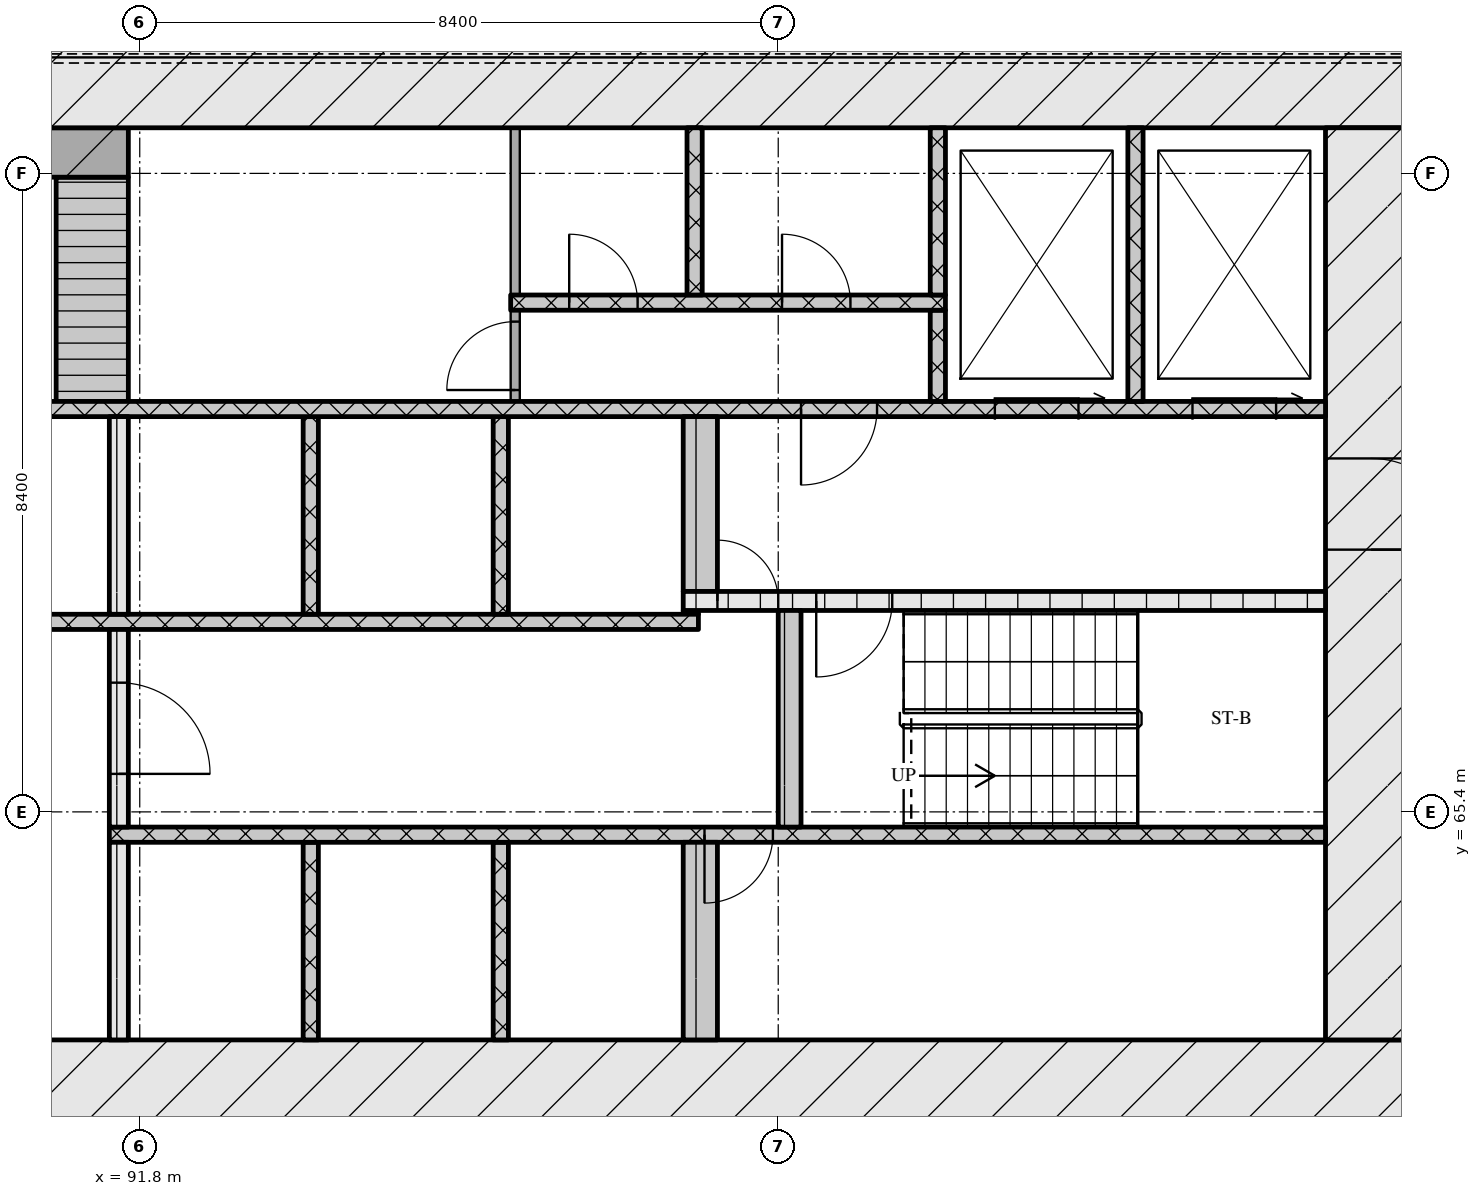
"""IFC4 building model, lengths in metres.
Left out: names, types, materials, properties, quantities, classifications, styles, units other than length and angle.
Written with IfcOpenShell. Run it as: python <this file> out.ifc"""

import sys

from ifc_helpers import new_model, si_unit, direction, frame, frame_2d, origin, place, context, subcontext, project, spatial, rectangle, extrude, element, fill, save


model = new_model("IFC4")
c1 = context("Model", 3, precision=1e-05, world=origin(), true_north=direction((0.0, 1.0)))
c2 = subcontext(c1, "Body", "Model", "MODEL_VIEW")
j1 = project(units=[si_unit("LENGTHUNIT", "METRE"), si_unit("PLANEANGLEUNIT", "RADIAN")], contexts=[c1])
p1 = place(None, origin())
s1 = spatial("IfcSite", under=j1, at=p1, CompositionType="ELEMENT")
p2 = place(p1, origin())
s2 = spatial("IfcBuilding", under=s1, at=p2, CompositionType="ELEMENT")
p3 = place(p2, frame((0.0, 0.0, 32.7)))
s3 = spatial("IfcBuildingStorey", under=s2, at=p3, CompositionType="ELEMENT", Elevation=32.7)
p4 = place(p3, frame((66.6, 61.8, 0.0), z_axis=(0.0, 0.0, 1.0), x_axis=(1.0, 0.0, 0.0)))
e1 = element("IfcWall", 1, at=p4, inside=s3, PredefinedType="SOLIDWALL", context=c2, shape_type="SweptSolid", body=[
    extrude(rectangle(XDim=42.0, YDim=1.2, at=frame_2d((21.0, 0.0))), origin(), (0.0, 0.0, 1.0), 4.22),
])
p5 = place(p4, frame((21.35, 0.0, 0.0)))
e2 = element("IfcOpeningElement", 2, at=p5, cuts=e1, PredefinedType="OPENING", context=c2, shape_type="SweptSolid", body=[
    extrude(rectangle(XDim=1.8, YDim=2.1, at=frame_2d((0.9, 1.05))), frame((0.0, 0.61, 0.0), z_axis=(0.0, -1.0, 0.0), x_axis=(1.0, 0.0, 0.0)), (0.0, 0.0, 1.0), 1.22),
])
p6 = place(p3, frame((66.6, 75.0, 0.0), z_axis=(0.0, 0.0, 1.0), x_axis=(1.0, 0.0, 0.0)))
e3 = element("IfcWall", 3, at=p6, inside=s3, PredefinedType="SOLIDWALL", context=c2, shape_type="SweptSolid", body=[
    extrude(rectangle(XDim=42.0, YDim=1.2, at=frame_2d((21.0, 0.0))), origin(), (0.0, 0.0, 1.0), 4.22),
])
p7 = place(p3, frame((108.0, 62.4, 0.0), z_axis=(0.0, 0.0, 1.0), x_axis=(0.0, 1.0, 0.0)))
e4 = element("IfcWall", 4, at=p7, inside=s3, PredefinedType="SOLIDWALL", context=c2, shape_type="SweptSolid", body=[
    extrude(rectangle(XDim=12.0, YDim=1.2, at=frame_2d((6.0, 0.0))), origin(), (0.0, 0.0, 1.0), 4.22),
])
p8 = place(p7, frame((6.45, 0.0, 0.0)))
e5 = element("IfcOpeningElement", 5, at=p8, cuts=e4, PredefinedType="OPENING", context=c2, shape_type="SweptSolid", body=[
    extrude(rectangle(XDim=1.2, YDim=2.1, at=frame_2d((0.6, 1.05))), frame((0.0, 0.61, 0.0), z_axis=(0.0, -1.0, 0.0), x_axis=(1.0, 0.0, 0.0)), (0.0, 0.0, 1.0), 1.22),
])
p9 = place(p3, frame((91.525, 62.4, 0.0), z_axis=(0.0, 0.0, 1.0), x_axis=(0.0, 1.0, 0.0)))
e6 = element("IfcWall", 6, at=p9, inside=s3, PredefinedType="SOLIDWALL", context=c2, shape_type="SweptSolid", body=[
    extrude(rectangle(XDim=2.6, YDim=0.25, at=frame_2d((1.3, 0.0))), origin(), (0.0, 0.0, 1.0), 4.22),
])
for number, where, z_axis, x_axis in (
    (7, (94.05, 62.4, 0.0), (0.0, 0.0, 1.0), (0.0, 1.0, 0.0)),
    (8, (96.55, 62.4, 0.0), (0.0, 0.0, 1.0), (0.0, 1.0, 0.0)),
):
    element("IfcWall", number, at=place(p3, frame(where, z_axis=z_axis, x_axis=x_axis)), inside=s3, PredefinedType="SOLIDWALL", context=c2, shape_type="SweptSolid", body=[
        extrude(rectangle(XDim=2.6, YDim=0.2, at=frame_2d((1.3, 0.0))), origin(), (0.0, 0.0, 1.0), 4.22),
    ])
p10 = place(p3, frame((99.175, 62.4, 0.0), z_axis=(0.0, 0.0, 1.0), x_axis=(0.0, 1.0, 0.0)))
e9 = element("IfcWall", 9, at=p10, inside=s3, PredefinedType="SOLIDWALL", context=c2, shape_type="SweptSolid", body=[
    extrude(rectangle(XDim=2.6, YDim=0.45, at=frame_2d((1.3, 0.0))), origin(), (0.0, 0.0, 1.0), 4.22),
])
p11 = place(p3, frame((91.4, 65.1, 0.0), z_axis=(0.0, 0.0, 1.0), x_axis=(1.0, 0.0, 0.0)))
e10 = element("IfcWall", 10, at=p11, inside=s3, PredefinedType="SOLIDWALL", context=c2, shape_type="SweptSolid", body=[
    extrude(rectangle(XDim=16.0, YDim=0.2, at=frame_2d((8.0, 0.0))), origin(), (0.0, 0.0, 1.0), 4.22),
])
p12 = place(p11, frame((7.83, 0.0, 0.0)))
e11 = element("IfcOpeningElement", 11, at=p12, cuts=e10, PredefinedType="OPENING", context=c2, shape_type="SweptSolid", body=[
    extrude(rectangle(XDim=0.9, YDim=2.1, at=frame_2d((0.45, 1.05))), frame((0.0, 0.11, 0.0), z_axis=(0.0, -1.0, 0.0), x_axis=(1.0, 0.0, 0.0)), (0.0, 0.0, 1.0), 0.22),
])
p13 = place(p3, frame((91.525, 65.2, 0.0), z_axis=(0.0, 0.0, 1.0), x_axis=(0.0, 1.0, 0.0)))
e12 = element("IfcWall", 12, at=p13, inside=s3, PredefinedType="SOLIDWALL", context=c2, shape_type="SweptSolid", body=[
    extrude(rectangle(XDim=2.6, YDim=0.25, at=frame_2d((1.3, 0.0))), origin(), (0.0, 0.0, 1.0), 4.22),
])
p14 = place(p13, frame((0.7, 0.0, 0.0)))
e13 = element("IfcOpeningElement", 13, at=p14, cuts=e12, PredefinedType="OPENING", context=c2, shape_type="SweptSolid", body=[
    extrude(rectangle(XDim=1.2, YDim=2.1, at=frame_2d((0.6, 1.05))), frame((0.0, 0.135, 0.0), z_axis=(0.0, -1.0, 0.0), x_axis=(1.0, 0.0, 0.0)), (0.0, 0.0, 1.0), 0.27),
])
p15 = place(p3, frame((100.35, 65.2, 0.0), z_axis=(0.0, 0.0, 1.0), x_axis=(0.0, 1.0, 0.0)))
e14 = element("IfcWall", 14, at=p15, inside=s3, PredefinedType="SOLIDWALL", context=c2, shape_type="SweptSolid", body=[
    extrude(rectangle(XDim=2.85, YDim=0.3, at=frame_2d((1.425, 0.0))), origin(), (0.0, 0.0, 1.0), 4.22),
])
p16 = place(p3, frame((76.05, 67.9, 0.0), z_axis=(0.0, 0.0, 1.0), x_axis=(1.0, 0.0, 0.0)))
e15 = element("IfcWall", 15, at=p16, inside=s3, PredefinedType="SOLIDWALL", context=c2, shape_type="SweptSolid", body=[
    extrude(rectangle(XDim=23.1, YDim=0.2, at=frame_2d((11.55, 0.0))), origin(), (0.0, 0.0, 1.0), 4.22),
])
p17 = place(p16, frame((8.35, 0.0, 0.0)))
e16 = element("IfcOpeningElement", 16, at=p17, cuts=e15, PredefinedType="OPENING", context=c2, shape_type="SweptSolid", body=[
    extrude(rectangle(XDim=1.1, YDim=2.1, at=frame_2d((0.55, 1.05))), frame((0.0, 0.11, 0.0), z_axis=(0.0, -1.0, 0.0), x_axis=(1.0, 0.0, 0.0)), (0.0, 0.0, 1.0), 0.22),
])
p18 = place(p16, frame((10.85, 0.0, 0.0)))
e17 = element("IfcOpeningElement", 17, at=p18, cuts=e15, PredefinedType="OPENING", context=c2, shape_type="SweptSolid", body=[
    extrude(rectangle(XDim=1.1, YDim=2.1, at=frame_2d((0.55, 1.05))), frame((0.0, 0.11, 0.0), z_axis=(0.0, -1.0, 0.0), x_axis=(1.0, 0.0, 0.0)), (0.0, 0.0, 1.0), 0.22),
])
p19 = place(p16, frame((13.55, 0.0, 0.0)))
e18 = element("IfcOpeningElement", 18, at=p19, cuts=e15, PredefinedType="OPENING", context=c2, shape_type="SweptSolid", body=[
    extrude(rectangle(XDim=1.0, YDim=2.1, at=frame_2d((0.5, 1.05))), frame((0.0, 0.11, 0.0), z_axis=(0.0, -1.0, 0.0), x_axis=(1.0, 0.0, 0.0)), (0.0, 0.0, 1.0), 0.22),
])
p20 = place(p3, frame((91.525, 68.0, 0.0), z_axis=(0.0, 0.0, 1.0), x_axis=(0.0, 1.0, 0.0)))
e19 = element("IfcWall", 19, at=p20, inside=s3, PredefinedType="SOLIDWALL", context=c2, shape_type="SweptSolid", body=[
    extrude(rectangle(XDim=2.6, YDim=0.25, at=frame_2d((1.3, 0.0))), origin(), (0.0, 0.0, 1.0), 4.22),
])
for number, where, z_axis, x_axis in (
    (20, (94.05, 68.0, 0.0), (0.0, 0.0, 1.0), (0.0, 1.0, 0.0)),
    (21, (96.55, 68.0, 0.0), (0.0, 0.0, 1.0), (0.0, 1.0, 0.0)),
):
    element("IfcWall", number, at=place(p3, frame(where, z_axis=z_axis, x_axis=x_axis)), inside=s3, PredefinedType="SOLIDWALL", context=c2, shape_type="SweptSolid", body=[
        extrude(rectangle(XDim=2.6, YDim=0.2, at=frame_2d((1.3, 0.0))), origin(), (0.0, 0.0, 1.0), 4.22),
    ])
p21 = place(p3, frame((98.95, 68.025, 0.0), z_axis=(0.0, 0.0, 1.0), x_axis=(1.0, 0.0, 0.0)))
e22 = element("IfcWall", 22, at=p21, inside=s3, PredefinedType="SOLIDWALL", context=c2, shape_type="SweptSolid", body=[
    extrude(rectangle(XDim=0.2, YDim=0.05, at=frame_2d((0.1, 0.0))), origin(), (0.0, 0.0, 1.0), 4.22),
])
p22 = place(p3, frame((98.95, 68.175, 0.0), z_axis=(0.0, 0.0, 1.0), x_axis=(1.0, 0.0, 0.0)))
e23 = element("IfcWall", 23, at=p22, inside=s3, PredefinedType="SOLIDWALL", context=c2, shape_type="SweptSolid", body=[
    extrude(rectangle(XDim=8.45, YDim=0.25, at=frame_2d((4.225, 0.0))), origin(), (0.0, 0.0, 1.0), 4.22),
])
p23 = place(p22, frame((0.45, 0.0, 0.0)))
e24 = element("IfcOpeningElement", 24, at=p23, cuts=e23, PredefinedType="OPENING", context=c2, shape_type="SweptSolid", body=[
    extrude(rectangle(XDim=0.8, YDim=2.1, at=frame_2d((0.4, 1.05))), frame((0.0, 0.135, 0.0), z_axis=(0.0, -1.0, 0.0), x_axis=(1.0, 0.0, 0.0)), (0.0, 0.0, 1.0), 0.27),
])
p24 = place(p22, frame((1.75, 0.0, 0.0)))
e25 = element("IfcOpeningElement", 25, at=p24, cuts=e23, PredefinedType="OPENING", context=c2, shape_type="SweptSolid", body=[
    extrude(rectangle(XDim=1.0, YDim=2.1, at=frame_2d((0.5, 1.05))), frame((0.0, 0.135, 0.0), z_axis=(0.0, -1.0, 0.0), x_axis=(1.0, 0.0, 0.0)), (0.0, 0.0, 1.0), 0.27),
])
p25 = place(p3, frame((99.175, 68.3, 0.0), z_axis=(0.0, 0.0, 1.0), x_axis=(0.0, 1.0, 0.0)))
e26 = element("IfcWall", 26, at=p25, inside=s3, PredefinedType="SOLIDWALL", context=c2, shape_type="SweptSolid", body=[
    extrude(rectangle(XDim=2.3, YDim=0.45, at=frame_2d((1.15, 0.0))), origin(), (0.0, 0.0, 1.0), 4.22),
])
p26 = place(p3, frame((67.8, 70.7, 0.0), z_axis=(0.0, 0.0, 1.0), x_axis=(1.0, 0.0, 0.0)))
e27 = element("IfcWall", 27, at=p26, inside=s3, PredefinedType="SOLIDWALL", context=c2, shape_type="SweptSolid", body=[
    extrude(rectangle(XDim=39.6, YDim=0.2, at=frame_2d((19.8, 0.0))), origin(), (0.0, 0.0, 1.0), 4.22),
])
p27 = place(p26, frame((0.65, 0.0, 0.0)))
e28 = element("IfcOpeningElement", 28, at=p27, cuts=e27, PredefinedType="OPENING", context=c2, shape_type="SweptSolid", body=[
    extrude(rectangle(XDim=1.1, YDim=2.1, at=frame_2d((0.55, 1.05))), frame((0.0, 0.11, 0.0), z_axis=(0.0, -1.0, 0.0), x_axis=(1.0, 0.0, 0.0)), (0.0, 0.0, 1.0), 0.22),
])
p28 = place(p26, frame((3.25, 0.0, 0.0)))
e29 = element("IfcOpeningElement", 29, at=p28, cuts=e27, PredefinedType="OPENING", context=c2, shape_type="SweptSolid", body=[
    extrude(rectangle(XDim=1.1, YDim=2.1, at=frame_2d((0.55, 1.05))), frame((0.0, 0.11, 0.0), z_axis=(0.0, -1.0, 0.0), x_axis=(1.0, 0.0, 0.0)), (0.0, 0.0, 1.0), 0.22),
])
p29 = place(p26, frame((5.9, 0.0, 0.0)))
e30 = element("IfcOpeningElement", 30, at=p29, cuts=e27, PredefinedType="OPENING", context=c2, shape_type="SweptSolid", body=[
    extrude(rectangle(XDim=1.0, YDim=2.1, at=frame_2d((0.5, 1.05))), frame((0.0, 0.11, 0.0), z_axis=(0.0, -1.0, 0.0), x_axis=(1.0, 0.0, 0.0)), (0.0, 0.0, 1.0), 0.22),
])
p30 = place(p26, frame((21.7, 0.0, 0.0)))
e31 = element("IfcOpeningElement", 31, at=p30, cuts=e27, PredefinedType="OPENING", context=c2, shape_type="SweptSolid", body=[
    extrude(rectangle(XDim=1.0, YDim=2.1, at=frame_2d((0.5, 1.05))), frame((0.0, 0.11, 0.0), z_axis=(0.0, -1.0, 0.0), x_axis=(1.0, 0.0, 0.0)), (0.0, 0.0, 1.0), 0.22),
])
p31 = place(p26, frame((32.7, 0.0, 0.0)))
e32 = element("IfcOpeningElement", 32, at=p31, cuts=e27, PredefinedType="OPENING", context=c2, shape_type="SweptSolid", body=[
    extrude(rectangle(XDim=1.0, YDim=2.1, at=frame_2d((0.5, 1.05))), frame((0.0, 0.11, 0.0), z_axis=(0.0, -1.0, 0.0), x_axis=(1.0, 0.0, 0.0)), (0.0, 0.0, 1.0), 0.22),
])
p32 = place(p26, frame((35.25, 0.0, 0.0)))
e33 = element("IfcOpeningElement", 33, at=p32, cuts=e27, PredefinedType="OPENING", context=c2, shape_type="SweptSolid", body=[
    extrude(rectangle(XDim=1.1, YDim=2.1, at=frame_2d((0.55, 1.05))), frame((0.0, 0.11, 0.0), z_axis=(0.0, -1.0, 0.0), x_axis=(1.0, 0.0, 0.0)), (0.0, 0.0, 1.0), 0.22),
])
p33 = place(p26, frame((37.85, 0.0, 0.0)))
e34 = element("IfcOpeningElement", 34, at=p33, cuts=e27, PredefinedType="OPENING", context=c2, shape_type="SweptSolid", body=[
    extrude(rectangle(XDim=1.1, YDim=2.1, at=frame_2d((0.55, 1.05))), frame((0.0, 0.11, 0.0), z_axis=(0.0, -1.0, 0.0), x_axis=(1.0, 0.0, 0.0)), (0.0, 0.0, 1.0), 0.22),
])
p34 = place(p3, frame((91.175, 70.8, 0.0), z_axis=(0.0, 0.0, 1.0), x_axis=(0.0, 1.0, 0.0)))
e35 = element("IfcWall", 35, at=p34, inside=s3, PredefinedType="SOLIDWALL", context=c2, shape_type="SweptSolid", body=[
    extrude(rectangle(XDim=2.95, YDim=0.95, at=frame_2d((1.475, 0.0))), origin(), (0.0, 0.0, 1.0), 4.22),
])
p35 = place(p3, frame((96.74, 70.8, 0.0), z_axis=(0.0, 0.0, 1.0), x_axis=(0.0, 1.0, 0.0)))
e36 = element("IfcWall", 36, at=p35, inside=s3, PredefinedType="PARTITIONING", context=c2, shape_type="SweptSolid", body=[
    extrude(rectangle(XDim=1.2, YDim=0.12, at=frame_2d((0.6, 0.0))), origin(), (0.0, 0.0, 1.0), 4.22),
])
p36 = place(p35, frame((0.15, 0.0, 0.0)))
e37 = element("IfcOpeningElement", 37, at=p36, cuts=e36, PredefinedType="OPENING", context=c2, shape_type="SweptSolid", body=[
    extrude(rectangle(XDim=0.9, YDim=2.1, at=frame_2d((0.45, 1.05))), frame((0.0, 0.07, 0.0), z_axis=(0.0, -1.0, 0.0), x_axis=(1.0, 0.0, 0.0)), (0.0, 0.0, 1.0), 0.14),
])
p37 = place(p3, frame((102.3, 70.8, 0.0), z_axis=(0.0, 0.0, 1.0), x_axis=(0.0, 1.0, 0.0)))
e38 = element("IfcWall", 38, at=p37, inside=s3, PredefinedType="SOLIDWALL", context=c2, shape_type="SweptSolid", body=[
    extrude(rectangle(XDim=1.2, YDim=0.2, at=frame_2d((0.6, 0.0))), origin(), (0.0, 0.0, 1.0), 4.22),
])
p38 = place(p3, frame((104.9, 70.8, 0.0), z_axis=(0.0, 0.0, 1.0), x_axis=(0.0, 1.0, 0.0)))
e39 = element("IfcWall", 39, at=p38, inside=s3, PredefinedType="SOLIDWALL", context=c2, shape_type="SweptSolid", body=[
    extrude(rectangle(XDim=3.6, YDim=0.2, at=frame_2d((1.8, 0.0))), origin(), (0.0, 0.0, 1.0), 4.22),
])
p39 = place(p3, frame((96.68, 72.1, 0.0), z_axis=(0.0, 0.0, 1.0), x_axis=(1.0, 0.0, 0.0)))
e40 = element("IfcWall", 40, at=p39, inside=s3, PredefinedType="SOLIDWALL", context=c2, shape_type="SweptSolid", body=[
    extrude(rectangle(XDim=5.72, YDim=0.2, at=frame_2d((2.86, 0.0))), origin(), (0.0, 0.0, 1.0), 4.22),
])
p40 = place(p39, frame((0.77, 0.0, 0.0)))
e41 = element("IfcOpeningElement", 41, at=p40, cuts=e40, PredefinedType="OPENING", context=c2, shape_type="SweptSolid", body=[
    extrude(rectangle(XDim=0.9, YDim=2.1, at=frame_2d((0.45, 1.05))), frame((0.0, 0.11, 0.0), z_axis=(0.0, -1.0, 0.0), x_axis=(1.0, 0.0, 0.0)), (0.0, 0.0, 1.0), 0.22),
])
p41 = place(p39, frame((3.57, 0.0, 0.0)))
e42 = element("IfcOpeningElement", 42, at=p41, cuts=e40, PredefinedType="OPENING", context=c2, shape_type="SweptSolid", body=[
    extrude(rectangle(XDim=0.9, YDim=2.1, at=frame_2d((0.45, 1.05))), frame((0.0, 0.11, 0.0), z_axis=(0.0, -1.0, 0.0), x_axis=(1.0, 0.0, 0.0)), (0.0, 0.0, 1.0), 0.22),
])
p42 = place(p3, frame((96.74, 72.2, 0.0), z_axis=(0.0, 0.0, 1.0), x_axis=(0.0, 1.0, 0.0)))
e43 = element("IfcWall", 43, at=p42, inside=s3, PredefinedType="PARTITIONING", context=c2, shape_type="SweptSolid", body=[
    extrude(rectangle(XDim=2.2, YDim=0.12, at=frame_2d((1.1, 0.0))), origin(), (0.0, 0.0, 1.0), 4.22),
])
for number, where, z_axis, x_axis in (
    (44, (99.1, 72.2, 0.0), (0.0, 0.0, 1.0), (0.0, 1.0, 0.0)),
    (45, (102.3, 72.2, 0.0), (0.0, 0.0, 1.0), (0.0, 1.0, 0.0)),
):
    element("IfcWall", number, at=place(p3, frame(where, z_axis=z_axis, x_axis=x_axis)), inside=s3, PredefinedType="SOLIDWALL", context=c2, shape_type="SweptSolid", body=[
        extrude(rectangle(XDim=2.2, YDim=0.2, at=frame_2d((1.1, 0.0))), origin(), (0.0, 0.0, 1.0), 4.22),
    ])
p43 = place(p3, frame((83.55, 74.075, 0.0), z_axis=(0.0, 0.0, 1.0), x_axis=(1.0, 0.0, 0.0)))
e46 = element("IfcWall", 46, at=p43, inside=s3, PredefinedType="SOLIDWALL", context=c2, shape_type="SweptSolid", body=[
    extrude(rectangle(XDim=8.1, YDim=0.65, at=frame_2d((4.05, 0.0))), origin(), (0.0, 0.0, 1.0), 4.22),
])
p44 = place(p12, origin())
e47 = element("IfcDoor", 47, at=p44, inside=s3, OperationType="SINGLE_SWING_RIGHT", PredefinedType="DOOR", context=c2, shape_type="SweptSolid", body=[
    extrude(rectangle(XDim=0.9, YDim=2.1, at=frame_2d((0.45, 1.05))), frame((0.0, 0.025, 0.0), z_axis=(0.0, -1.0, 0.0), x_axis=(1.0, 0.0, 0.0)), (0.0, 0.0, 1.0), 0.05),
])
fill(e11, e47)
p45 = place(p14, origin())
e48 = element("IfcDoor", 48, at=p45, inside=s3, OperationType="SINGLE_SWING_RIGHT", PredefinedType="DOOR", context=c2, shape_type="SweptSolid", body=[
    extrude(rectangle(XDim=1.2, YDim=2.1, at=frame_2d((0.6, 1.05))), frame((0.0, 0.025, 0.0), z_axis=(0.0, -1.0, 0.0), x_axis=(1.0, 0.0, 0.0)), (0.0, 0.0, 1.0), 0.05),
])
fill(e13, e48)
p46 = place(p23, origin())
e49 = element("IfcDoor", 49, at=p46, inside=s3, OperationType="SINGLE_SWING_LEFT", PredefinedType="DOOR", context=c2, shape_type="SweptSolid", body=[
    extrude(rectangle(XDim=0.8, YDim=2.1, at=frame_2d((0.4, 1.05))), frame((0.0, 0.025, 0.0), z_axis=(0.0, -1.0, 0.0), x_axis=(1.0, 0.0, 0.0)), (0.0, 0.0, 1.0), 0.05),
])
fill(e24, e49)
p47 = place(p24, origin())
e50 = element("IfcDoor", 50, at=p47, inside=s3, OperationType="SINGLE_SWING_RIGHT", PredefinedType="DOOR", context=c2, shape_type="SweptSolid", body=[
    extrude(rectangle(XDim=1.0, YDim=2.1, at=frame_2d((0.5, 1.05))), frame((0.0, 0.025, 0.0), z_axis=(0.0, -1.0, 0.0), x_axis=(1.0, 0.0, 0.0)), (0.0, 0.0, 1.0), 0.05),
])
fill(e25, e50)
p48 = place(p8, origin())
e51 = element("IfcDoor", 51, at=p48, inside=s3, OperationType="SINGLE_SWING_RIGHT", PredefinedType="DOOR", context=c2, shape_type="SweptSolid", body=[
    extrude(rectangle(XDim=1.2, YDim=2.1, at=frame_2d((0.6, 1.05))), frame((0.0, 0.025, 0.0), z_axis=(0.0, -1.0, 0.0), x_axis=(1.0, 0.0, 0.0)), (0.0, 0.0, 1.0), 0.05),
])
fill(e5, e51)
p49 = place(p31, origin())
e52 = element("IfcDoor", 52, at=p49, inside=s3, OperationType="SINGLE_SWING_RIGHT", PredefinedType="DOOR", context=c2, shape_type="SweptSolid", body=[
    extrude(rectangle(XDim=1.0, YDim=2.1, at=frame_2d((0.5, 1.05))), frame((0.0, 0.025, 0.0), z_axis=(0.0, -1.0, 0.0), x_axis=(1.0, 0.0, 0.0)), (0.0, 0.0, 1.0), 0.05),
])
fill(e32, e52)
p50 = place(p32, origin())
e53 = element("IfcDoor", 53, at=p50, inside=s3, OperationType="SLIDING_TO_RIGHT", PredefinedType="DOOR", context=c2, shape_type="SweptSolid", body=[
    extrude(rectangle(XDim=1.1, YDim=2.1, at=frame_2d((0.55, 1.05))), frame((0.0, 0.025, 0.0), z_axis=(0.0, -1.0, 0.0), x_axis=(1.0, 0.0, 0.0)), (0.0, 0.0, 1.0), 0.05),
])
fill(e33, e53)
p51 = place(p33, origin())
e54 = element("IfcDoor", 54, at=p51, inside=s3, OperationType="SLIDING_TO_RIGHT", PredefinedType="DOOR", context=c2, shape_type="SweptSolid", body=[
    extrude(rectangle(XDim=1.1, YDim=2.1, at=frame_2d((0.55, 1.05))), frame((0.0, 0.025, 0.0), z_axis=(0.0, -1.0, 0.0), x_axis=(1.0, 0.0, 0.0)), (0.0, 0.0, 1.0), 0.05),
])
fill(e34, e54)
p52 = place(p36, origin())
e55 = element("IfcDoor", 55, at=p52, inside=s3, OperationType="SINGLE_SWING_LEFT", PredefinedType="DOOR", context=c2, shape_type="SweptSolid", body=[
    extrude(rectangle(XDim=0.9, YDim=2.1, at=frame_2d((0.45, 1.05))), frame((0.0, 0.025, 0.0), z_axis=(0.0, -1.0, 0.0), x_axis=(1.0, 0.0, 0.0)), (0.0, 0.0, 1.0), 0.05),
])
fill(e37, e55)
p53 = place(p40, origin())
e56 = element("IfcDoor", 56, at=p53, inside=s3, OperationType="SINGLE_SWING_LEFT", PredefinedType="DOOR", context=c2, shape_type="SweptSolid", body=[
    extrude(rectangle(XDim=0.9, YDim=2.1, at=frame_2d((0.45, 1.05))), frame((0.0, 0.025, 0.0), z_axis=(0.0, -1.0, 0.0), x_axis=(1.0, 0.0, 0.0)), (0.0, 0.0, 1.0), 0.05),
])
fill(e41, e56)
p54 = place(p41, origin())
e57 = element("IfcDoor", 57, at=p54, inside=s3, OperationType="SINGLE_SWING_LEFT", PredefinedType="DOOR", context=c2, shape_type="SweptSolid", body=[
    extrude(rectangle(XDim=0.9, YDim=2.1, at=frame_2d((0.45, 1.05))), frame((0.0, 0.025, 0.0), z_axis=(0.0, -1.0, 0.0), x_axis=(1.0, 0.0, 0.0)), (0.0, 0.0, 1.0), 0.05),
])
fill(e42, e57)
save(model, sys.argv[1])
